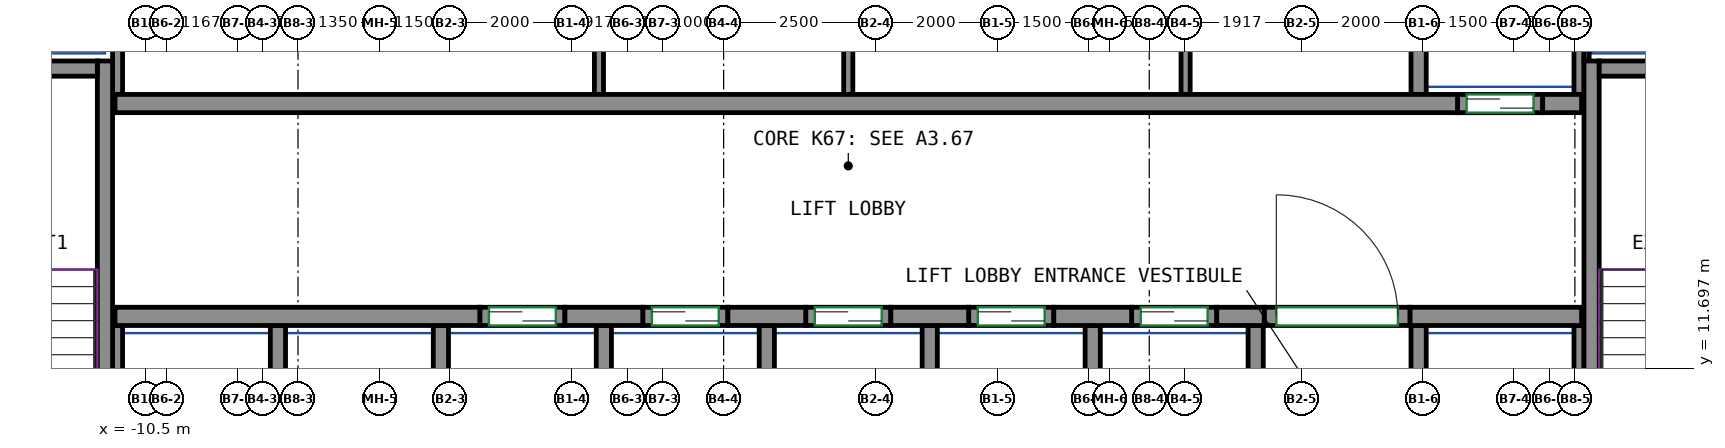
"""IFC4 building model, lengths in metres.
Left out: names, types, materials, properties, quantities, classifications, styles, units other than length and angle.
Written with IfcOpenShell. Run it as: python <this file> out.ifc"""

import sys

from ifc_helpers import new_model, si_unit, direction, frame, frame_2d, origin, place, context, subcontext, project, spatial, rectangle, extrude, source, transform, mapped, element, fill, save


model = new_model("IFC4")
c1 = context("Model", 3, precision=1e-05, world=origin(), true_north=direction((0.0, 1.0)))
c2 = subcontext(c1, "Body", "Model", "MODEL_VIEW")
j1 = project(units=[si_unit("LENGTHUNIT", "METRE"), si_unit("PLANEANGLEUNIT", "RADIAN")], contexts=[c1])
p1 = place(None, origin())
s1 = spatial("IfcSite", under=j1, at=p1, CompositionType="ELEMENT")
p2 = place(p1, origin())
s2 = spatial("IfcBuilding", under=s1, at=p2, CompositionType="ELEMENT")
p3 = place(p2, frame((0.0, 0.0, 270.4)))
s3 = spatial("IfcBuildingStorey", under=s2, at=p3, CompositionType="ELEMENT", Elevation=270.4)
m1 = source(origin(), c2, "Body", "SweptSolid", [
    extrude(rectangle(XDim=7.75, YDim=0.25, at=frame_2d((3.875, 0.0))), origin(), (0.0, 0.0, 1.0), 3.12),
])
p4 = place(p3, frame((-11.175, 9.0, 0.0), z_axis=(0.0, 0.0, 1.0), x_axis=(0.0, 1.0, 0.0)))
e1 = element("IfcWall", 1, at=p4, inside=s3, PredefinedType="SHEAR", context=c2, shape_type="MappedRepresentation", body=[
    mapped(m1, transform((0.0, 0.0, 0.0))),
])
m2 = source(origin(), c2, "Body", "SweptSolid", [
    extrude(rectangle(XDim=3.7, YDim=0.25, at=frame_2d((1.85, 0.0))), origin(), (0.0, 0.0, 1.0), 3.12),
])
p5 = place(p3, frame((-15.0, 16.625, 0.0), z_axis=(0.0, 0.0, 1.0), x_axis=(1.0, 0.0, 0.0)))
e2 = element("IfcWall", 2, at=p5, inside=s3, PredefinedType="SHEAR", context=c2, shape_type="MappedRepresentation", body=[
    mapped(m2, transform((0.0, 0.0, 0.0))),
])
p6 = place(p3, frame((13.275, 9.0, 0.0), z_axis=(0.0, 0.0, 1.0), x_axis=(0.0, 1.0, 0.0)))
e3 = element("IfcWall", 3, at=p6, inside=s3, PredefinedType="SHEAR", context=c2, shape_type="MappedRepresentation", body=[
    mapped(m1, transform((0.0, 0.0, 0.0))),
])
m3 = source(origin(), c2, "Body", "SweptSolid", [
    extrude(rectangle(XDim=3.7, YDim=0.25, at=frame_2d((1.85, 0.0))), origin(), (0.0, 0.0, 1.0), 3.12),
])
p7 = place(p3, frame((13.4, 16.625, 0.0), z_axis=(0.0, 0.0, 1.0), x_axis=(1.0, 0.0, 0.0)))
e4 = element("IfcWall", 4, at=p7, inside=s3, PredefinedType="SHEAR", context=c2, shape_type="MappedRepresentation", body=[
    mapped(m3, transform((0.0, 0.0, 0.0))),
])
m4 = source(origin(), c2, "Body", "SweptSolid", [
    extrude(rectangle(XDim=6.0, YDim=0.3, at=frame_2d((3.0, 0.0))), origin(), (0.0, 0.0, 1.0), 3.12),
])
p8 = place(p3, frame((-11.01, 12.55, 0.0), z_axis=(0.0, 0.0, 1.0), x_axis=(1.0, 0.0, 0.0)))
e5 = element("IfcWall", 5, at=p8, inside=s3, PredefinedType="SHEAR", context=c2, shape_type="MappedRepresentation", body=[
    mapped(m4, transform((0.0, 0.0, 0.0))),
])
m5 = source(origin(), c2, "Body", "SweptSolid", [
    extrude(rectangle(XDim=1.28, YDim=0.3, at=frame_2d((0.64, 0.0))), origin(), (0.0, 0.0, 1.0), 3.12),
])
for number, where, z_axis, x_axis in (
    (6, (-3.61, 12.55, 0.0), (0.0, 0.0, 1.0), (1.0, 0.0, 0.0)),
    (7, (-0.93, 12.55, 0.0), (0.0, 0.0, 1.0), (1.0, 0.0, 0.0)),
    (8, (1.75, 12.55, 0.0), (0.0, 0.0, 1.0), (1.0, 0.0, 0.0)),
    (9, (4.43, 12.55, 0.0), (0.0, 0.0, 1.0), (1.0, 0.0, 0.0)),
):
    element("IfcWall", number, at=place(p3, frame(where, z_axis=z_axis, x_axis=x_axis)), inside=s3, PredefinedType="SHEAR", context=c2, shape_type="MappedRepresentation", body=[
        mapped(m5, transform((0.0, 0.0, 0.0))),
    ])
m6 = source(origin(), c2, "Body", "SweptSolid", [
    extrude(rectangle(XDim=0.78, YDim=0.3, at=frame_2d((0.39, 0.0))), origin(), (0.0, 0.0, 1.0), 3.12),
])
p9 = place(p3, frame((7.11, 12.55, 0.0), z_axis=(0.0, 0.0, 1.0), x_axis=(1.0, 0.0, 0.0)))
e10 = element("IfcWall", 10, at=p9, inside=s3, PredefinedType="SHEAR", context=c2, shape_type="MappedRepresentation", body=[
    mapped(m6, transform((0.0, 0.0, 0.0))),
])
m7 = source(origin(), c2, "Body", "SweptSolid", [
    extrude(rectangle(XDim=2.82, YDim=0.3, at=frame_2d((1.41, 0.0))), origin(), (0.0, 0.0, 1.0), 3.12),
])
p10 = place(p3, frame((10.29, 12.55, 0.0), z_axis=(0.0, 0.0, 1.0), x_axis=(1.0, 0.0, 0.0)))
e11 = element("IfcWall", 11, at=p10, inside=s3, PredefinedType="SHEAR", context=c2, shape_type="MappedRepresentation", body=[
    mapped(m7, transform((0.0, 0.0, 0.0))),
])
m8 = source(origin(), c2, "Body", "SweptSolid", [
    extrude(rectangle(XDim=22.08, YDim=0.3, at=frame_2d((11.04, 0.0))), origin(), (0.0, 0.0, 1.0), 3.12),
])
p11 = place(p3, frame((-11.01, 16.05, 0.0), z_axis=(0.0, 0.0, 1.0), x_axis=(1.0, 0.0, 0.0)))
e12 = element("IfcWall", 12, at=p11, inside=s3, PredefinedType="SHEAR", context=c2, shape_type="MappedRepresentation", body=[
    mapped(m8, transform((0.0, 0.0, 0.0))),
])
m9 = source(origin(), c2, "Body", "SweptSolid", [
    extrude(rectangle(XDim=0.64, YDim=0.3, at=frame_2d((0.32, 0.0))), origin(), (0.0, 0.0, 1.0), 3.12),
])
p12 = place(p3, frame((12.47, 16.05, 0.0), z_axis=(0.0, 0.0, 1.0), x_axis=(1.0, 0.0, 0.0)))
e13 = element("IfcWall", 13, at=p12, inside=s3, PredefinedType="SHEAR", context=c2, shape_type="MappedRepresentation", body=[
    mapped(m9, transform((0.0, 0.0, 0.0))),
])
m10 = source(origin(), c2, "Body", "SweptSolid", [
    extrude(rectangle(XDim=1.4, YDim=0.3, at=frame_2d((0.7, 0.0))), origin(), (0.0, 0.0, 1.0), 3.12),
])
p13 = place(p3, frame((-5.01, 12.55, 0.0), z_axis=(0.0, 0.0, 1.0), x_axis=(1.0, 0.0, 0.0)))
e14 = element("IfcWall", 14, at=p13, inside=s3, PredefinedType="PARTITIONING", context=c2, shape_type="MappedRepresentation", body=[
    mapped(m10, transform((0.0, 0.0, 0.0))),
])
p14 = place(p13, frame((0.15, 0.0, 0.0)))
e15 = element("IfcOpeningElement", 15, at=p14, cuts=e14, PredefinedType="OPENING", context=c2, shape_type="SweptSolid", body=[
    extrude(rectangle(XDim=1.1, YDim=2.1, at=frame_2d((0.55, 1.05))), frame((0.0, 0.16, 0.0), z_axis=(0.0, -1.0, 0.0), x_axis=(1.0, 0.0, 0.0)), (0.0, 0.0, 1.0), 0.32),
])
m11 = source(origin(), c2, "Body", "SweptSolid", [
    extrude(rectangle(XDim=1.4, YDim=0.3, at=frame_2d((0.7, 0.0))), origin(), (0.0, 0.0, 1.0), 3.12),
])
p15 = place(p3, frame((-2.33, 12.55, 0.0), z_axis=(0.0, 0.0, 1.0), x_axis=(1.0, 0.0, 0.0)))
e16 = element("IfcWall", 16, at=p15, inside=s3, PredefinedType="PARTITIONING", context=c2, shape_type="MappedRepresentation", body=[
    mapped(m11, transform((0.0, 0.0, 0.0))),
])
p16 = place(p15, frame((0.15, 0.0, 0.0)))
e17 = element("IfcOpeningElement", 17, at=p16, cuts=e16, PredefinedType="OPENING", context=c2, shape_type="SweptSolid", body=[
    extrude(rectangle(XDim=1.1, YDim=2.1, at=frame_2d((0.55, 1.05))), frame((0.0, 0.16, 0.0), z_axis=(0.0, -1.0, 0.0), x_axis=(1.0, 0.0, 0.0)), (0.0, 0.0, 1.0), 0.32),
])
p17 = place(p3, frame((0.35, 12.55, 0.0), z_axis=(0.0, 0.0, 1.0), x_axis=(1.0, 0.0, 0.0)))
e18 = element("IfcWall", 18, at=p17, inside=s3, PredefinedType="PARTITIONING", context=c2, shape_type="MappedRepresentation", body=[
    mapped(m10, transform((0.0, 0.0, 0.0))),
])
p18 = place(p17, frame((0.15, 0.0, 0.0)))
e19 = element("IfcOpeningElement", 19, at=p18, cuts=e18, PredefinedType="OPENING", context=c2, shape_type="SweptSolid", body=[
    extrude(rectangle(XDim=1.1, YDim=2.1, at=frame_2d((0.55, 1.05))), frame((0.0, 0.16, 0.0), z_axis=(0.0, -1.0, 0.0), x_axis=(1.0, 0.0, 0.0)), (0.0, 0.0, 1.0), 0.32),
])
p19 = place(p3, frame((3.03, 12.55, 0.0), z_axis=(0.0, 0.0, 1.0), x_axis=(1.0, 0.0, 0.0)))
e20 = element("IfcWall", 20, at=p19, inside=s3, PredefinedType="PARTITIONING", context=c2, shape_type="MappedRepresentation", body=[
    mapped(m10, transform((0.0, 0.0, 0.0))),
])
p20 = place(p19, frame((0.15, 0.0, 0.0)))
e21 = element("IfcOpeningElement", 21, at=p20, cuts=e20, PredefinedType="OPENING", context=c2, shape_type="SweptSolid", body=[
    extrude(rectangle(XDim=1.1, YDim=2.1, at=frame_2d((0.55, 1.05))), frame((0.0, 0.16, 0.0), z_axis=(0.0, -1.0, 0.0), x_axis=(1.0, 0.0, 0.0)), (0.0, 0.0, 1.0), 0.32),
])
p21 = place(p3, frame((5.71, 12.55, 0.0), z_axis=(0.0, 0.0, 1.0), x_axis=(1.0, 0.0, 0.0)))
e22 = element("IfcWall", 22, at=p21, inside=s3, PredefinedType="PARTITIONING", context=c2, shape_type="MappedRepresentation", body=[
    mapped(m11, transform((0.0, 0.0, 0.0))),
])
p22 = place(p21, frame((0.15, 0.0, 0.0)))
e23 = element("IfcOpeningElement", 23, at=p22, cuts=e22, PredefinedType="OPENING", context=c2, shape_type="SweptSolid", body=[
    extrude(rectangle(XDim=1.1, YDim=2.1, at=frame_2d((0.55, 1.05))), frame((0.0, 0.16, 0.0), z_axis=(0.0, -1.0, 0.0), x_axis=(1.0, 0.0, 0.0)), (0.0, 0.0, 1.0), 0.32),
])
p23 = place(p3, frame((11.07, 16.05, 0.0), z_axis=(0.0, 0.0, 1.0), x_axis=(1.0, 0.0, 0.0)))
e24 = element("IfcWall", 24, at=p23, inside=s3, PredefinedType="PARTITIONING", context=c2, shape_type="MappedRepresentation", body=[
    mapped(m10, transform((0.0, 0.0, 0.0))),
])
p24 = place(p23, frame((0.15, 0.0, 0.0)))
e25 = element("IfcOpeningElement", 25, at=p24, cuts=e24, PredefinedType="OPENING", context=c2, shape_type="SweptSolid", body=[
    extrude(rectangle(XDim=1.1, YDim=2.1, at=frame_2d((0.55, 1.05))), frame((0.0, 0.16, 0.0), z_axis=(0.0, -1.0, 0.0), x_axis=(1.0, 0.0, 0.0)), (0.0, 0.0, 1.0), 0.32),
])
m12 = source(origin(), c2, "Body", "SweptSolid", [
    extrude(rectangle(XDim=2.4, YDim=0.3, at=frame_2d((1.2, 0.0))), origin(), (0.0, 0.0, 1.0), 3.12),
])
p25 = place(p3, frame((7.89, 12.55, 0.0), z_axis=(0.0, 0.0, 1.0), x_axis=(1.0, 0.0, 0.0)))
e26 = element("IfcWall", 26, at=p25, inside=s3, PredefinedType="PARTITIONING", context=c2, shape_type="MappedRepresentation", body=[
    mapped(m12, transform((0.0, 0.0, 0.0))),
])
p26 = place(p25, frame((0.2, 0.0, 0.0)))
e27 = element("IfcOpeningElement", 27, at=p26, cuts=e26, PredefinedType="OPENING", context=c2, shape_type="SweptSolid", body=[
    extrude(rectangle(XDim=2.0, YDim=2.1, at=frame_2d((1.0, 1.05))), frame((0.0, 0.16, 0.0), z_axis=(0.0, -1.0, 0.0), x_axis=(1.0, 0.0, 0.0)), (0.0, 0.0, 1.0), 0.32),
])
m13 = source(origin(), c2, "Body", "SweptSolid", [
    extrude(rectangle(XDim=3.275, YDim=0.165, at=frame_2d((1.638, 0.0))), origin(), (0.0, 0.0, 1.0), 3.12),
])
p27 = place(p3, frame((13.067, 16.2, 0.0), z_axis=(0.0, 0.0, 1.0), x_axis=(0.0, 1.0, 0.0)))
e28 = element("IfcWall", 28, at=p27, inside=s3, PredefinedType="PARTITIONING", context=c2, shape_type="MappedRepresentation", body=[
    mapped(m13, transform((0.0, 0.0, 0.0))),
])
m14 = source(origin(), c2, "Body", "SweptSolid", [
    extrude(rectangle(XDim=4.8, YDim=0.165, at=frame_2d((2.4, 0.0))), origin(), (0.0, 0.0, 1.0), 3.12),
])
p28 = place(p3, frame((-10.968, 16.2, 0.0), z_axis=(0.0, 0.0, 1.0), x_axis=(0.0, 1.0, 0.0)))
e29 = element("IfcWall", 29, at=p28, inside=s3, PredefinedType="PARTITIONING", context=c2, shape_type="MappedRepresentation", body=[
    mapped(m14, transform((0.0, 0.0, 0.0))),
])
m15 = source(origin(), c2, "Body", "SweptSolid", [
    extrude(rectangle(XDim=3.275, YDim=0.25, at=frame_2d((1.638, 0.0))), origin(), (0.0, 0.0, 1.0), 3.12),
])
p29 = place(p3, frame((10.43, 16.2, 0.0), z_axis=(0.0, 0.0, 1.0), x_axis=(0.0, 1.0, 0.0)))
e30 = element("IfcWall", 30, at=p29, inside=s3, PredefinedType="PARTITIONING", context=c2, shape_type="MappedRepresentation", body=[
    mapped(m15, transform((0.0, 0.0, 0.0))),
])
m16 = source(origin(), c2, "Body", "SweptSolid", [
    extrude(rectangle(XDim=2.725, YDim=0.085, at=frame_2d((1.363, 0.0))), origin(), (0.0, 0.0, 1.0), 3.12),
])
p30 = place(p3, frame((13.192, 16.75, 0.0), z_axis=(0.0, 0.0, 1.0), x_axis=(0.0, 1.0, 0.0)))
e31 = element("IfcWall", 31, at=p30, inside=s3, PredefinedType="PARTITIONING", context=c2, shape_type="MappedRepresentation", body=[
    mapped(m16, transform((0.0, 0.0, 0.0))),
])
m17 = source(origin(), c2, "Body", "SweptSolid", [
    extrude(rectangle(XDim=3.4, YDim=0.25, at=frame_2d((1.7, 0.0))), origin(), (0.0, 0.0, 1.0), 3.12),
])
p31 = place(p3, frame((10.43, 9.0, 0.0), z_axis=(0.0, 0.0, 1.0), x_axis=(0.0, 1.0, 0.0)))
e32 = element("IfcWall", 32, at=p31, inside=s3, PredefinedType="PARTITIONING", context=c2, shape_type="MappedRepresentation", body=[
    mapped(m17, transform((0.0, 0.0, 0.0))),
])
m18 = source(origin(), c2, "Body", "SweptSolid", [
    extrude(rectangle(XDim=3.4, YDim=0.165, at=frame_2d((1.7, 0.0))), origin(), (0.0, 0.0, 1.0), 3.12),
])
p32 = place(p3, frame((13.067, 9.0, 0.0), z_axis=(0.0, 0.0, 1.0), x_axis=(0.0, 1.0, 0.0)))
e33 = element("IfcWall", 33, at=p32, inside=s3, PredefinedType="PARTITIONING", context=c2, shape_type="MappedRepresentation", body=[
    mapped(m18, transform((0.0, 0.0, 0.0))),
])
for number, where, z_axis, x_axis in (
    (34, (2.39, 9.0, 0.0), (0.0, 0.0, 1.0), (0.0, 1.0, 0.0)),
    (35, (5.07, 9.0, 0.0), (0.0, 0.0, 1.0), (0.0, 1.0, 0.0)),
    (36, (7.75, 9.0, 0.0), (0.0, 0.0, 1.0), (0.0, 1.0, 0.0)),
    (37, (-0.29, 9.0, 0.0), (0.0, 0.0, 1.0), (0.0, 1.0, 0.0)),
):
    element("IfcWall", number, at=place(p3, frame(where, z_axis=z_axis, x_axis=x_axis)), inside=s3, PredefinedType="PARTITIONING", context=c2, shape_type="MappedRepresentation", body=[
        mapped(m17, transform((0.0, 0.0, 0.0))),
    ])
p33 = place(p3, frame((-10.968, 9.0, 0.0), z_axis=(0.0, 0.0, 1.0), x_axis=(0.0, 1.0, 0.0)))
e38 = element("IfcWall", 38, at=p33, inside=s3, PredefinedType="PARTITIONING", context=c2, shape_type="MappedRepresentation", body=[
    mapped(m18, transform((0.0, 0.0, 0.0))),
])
for number, where, z_axis, x_axis in (
    (39, (-2.97, 9.0, 0.0), (0.0, 0.0, 1.0), (0.0, 1.0, 0.0)),
    (40, (-5.65, 9.0, 0.0), (0.0, 0.0, 1.0), (0.0, 1.0, 0.0)),
    (41, (-8.33, 9.0, 0.0), (0.0, 0.0, 1.0), (0.0, 1.0, 0.0)),
):
    element("IfcWall", number, at=place(p3, frame(where, z_axis=z_axis, x_axis=x_axis)), inside=s3, PredefinedType="PARTITIONING", context=c2, shape_type="MappedRepresentation", body=[
        mapped(m17, transform((0.0, 0.0, 0.0))),
    ])
m19 = source(origin(), c2, "Body", "SweptSolid", [
    extrude(rectangle(XDim=4.8, YDim=0.15, at=frame_2d((2.4, 0.0))), origin(), (0.0, 0.0, 1.0), 3.12),
])
for number, where, z_axis, x_axis in (
    (42, (-3.05, 16.2, 0.0), (0.0, 0.0, 1.0), (0.0, 1.0, 0.0)),
    (43, (1.05, 16.2, 0.0), (0.0, 0.0, 1.0), (0.0, 1.0, 0.0)),
    (44, (6.598, 16.2, 0.0), (0.0, 0.0, 1.0), (0.0, 1.0, 0.0)),
):
    element("IfcWall", number, at=place(p3, frame(where, z_axis=z_axis, x_axis=x_axis)), inside=s3, PredefinedType="PARTITIONING", context=c2, shape_type="MappedRepresentation", body=[
        mapped(m19, transform((0.0, 0.0, 0.0))),
    ])
p34 = place(p26, origin())
e45 = element("IfcDoor", 45, at=p34, inside=s3, OperationType="DOUBLE_DOOR_SINGLE_SWING", PredefinedType="DOOR", context=c2, shape_type="SweptSolid", body=[
    extrude(rectangle(XDim=2.0, YDim=2.1, at=frame_2d((1.0, 1.05))), frame((0.0, 0.025, 0.0), z_axis=(0.0, -1.0, 0.0), x_axis=(1.0, 0.0, 0.0)), (0.0, 0.0, 1.0), 0.05),
])
fill(e27, e45)
p35 = place(p14, origin())
e46 = element("IfcDoor", 46, at=p35, inside=s3, OperationType="DOUBLE_DOOR_SLIDING", PredefinedType="DOOR", context=c2, shape_type="SweptSolid", body=[
    extrude(rectangle(XDim=1.1, YDim=2.1, at=frame_2d((0.55, 1.05))), frame((0.0, 0.025, 0.0), z_axis=(0.0, -1.0, 0.0), x_axis=(1.0, 0.0, 0.0)), (0.0, 0.0, 1.0), 0.05),
])
fill(e15, e46)
p36 = place(p16, origin())
e47 = element("IfcDoor", 47, at=p36, inside=s3, OperationType="DOUBLE_DOOR_SLIDING", PredefinedType="DOOR", context=c2, shape_type="SweptSolid", body=[
    extrude(rectangle(XDim=1.1, YDim=2.1, at=frame_2d((0.55, 1.05))), frame((0.0, 0.025, 0.0), z_axis=(0.0, -1.0, 0.0), x_axis=(1.0, 0.0, 0.0)), (0.0, 0.0, 1.0), 0.05),
])
fill(e17, e47)
p37 = place(p18, origin())
e48 = element("IfcDoor", 48, at=p37, inside=s3, OperationType="DOUBLE_DOOR_SLIDING", PredefinedType="DOOR", context=c2, shape_type="SweptSolid", body=[
    extrude(rectangle(XDim=1.1, YDim=2.1, at=frame_2d((0.55, 1.05))), frame((0.0, 0.025, 0.0), z_axis=(0.0, -1.0, 0.0), x_axis=(1.0, 0.0, 0.0)), (0.0, 0.0, 1.0), 0.05),
])
fill(e19, e48)
p38 = place(p20, origin())
e49 = element("IfcDoor", 49, at=p38, inside=s3, OperationType="DOUBLE_DOOR_SLIDING", PredefinedType="DOOR", context=c2, shape_type="SweptSolid", body=[
    extrude(rectangle(XDim=1.1, YDim=2.1, at=frame_2d((0.55, 1.05))), frame((0.0, 0.025, 0.0), z_axis=(0.0, -1.0, 0.0), x_axis=(1.0, 0.0, 0.0)), (0.0, 0.0, 1.0), 0.05),
])
fill(e21, e49)
p39 = place(p22, origin())
e50 = element("IfcDoor", 50, at=p39, inside=s3, OperationType="DOUBLE_DOOR_SLIDING", PredefinedType="DOOR", context=c2, shape_type="SweptSolid", body=[
    extrude(rectangle(XDim=1.1, YDim=2.1, at=frame_2d((0.55, 1.05))), frame((0.0, 0.025, 0.0), z_axis=(0.0, -1.0, 0.0), x_axis=(1.0, 0.0, 0.0)), (0.0, 0.0, 1.0), 0.05),
])
fill(e23, e50)
p40 = place(p24, origin())
e51 = element("IfcDoor", 51, at=p40, inside=s3, OperationType="DOUBLE_DOOR_SLIDING", PredefinedType="DOOR", context=c2, shape_type="SweptSolid", body=[
    extrude(rectangle(XDim=1.1, YDim=2.1, at=frame_2d((0.55, 1.05))), frame((0.0, 0.025, 0.0), z_axis=(0.0, -1.0, 0.0), x_axis=(1.0, 0.0, 0.0)), (0.0, 0.0, 1.0), 0.05),
])
fill(e25, e51)
save(model, sys.argv[1])
